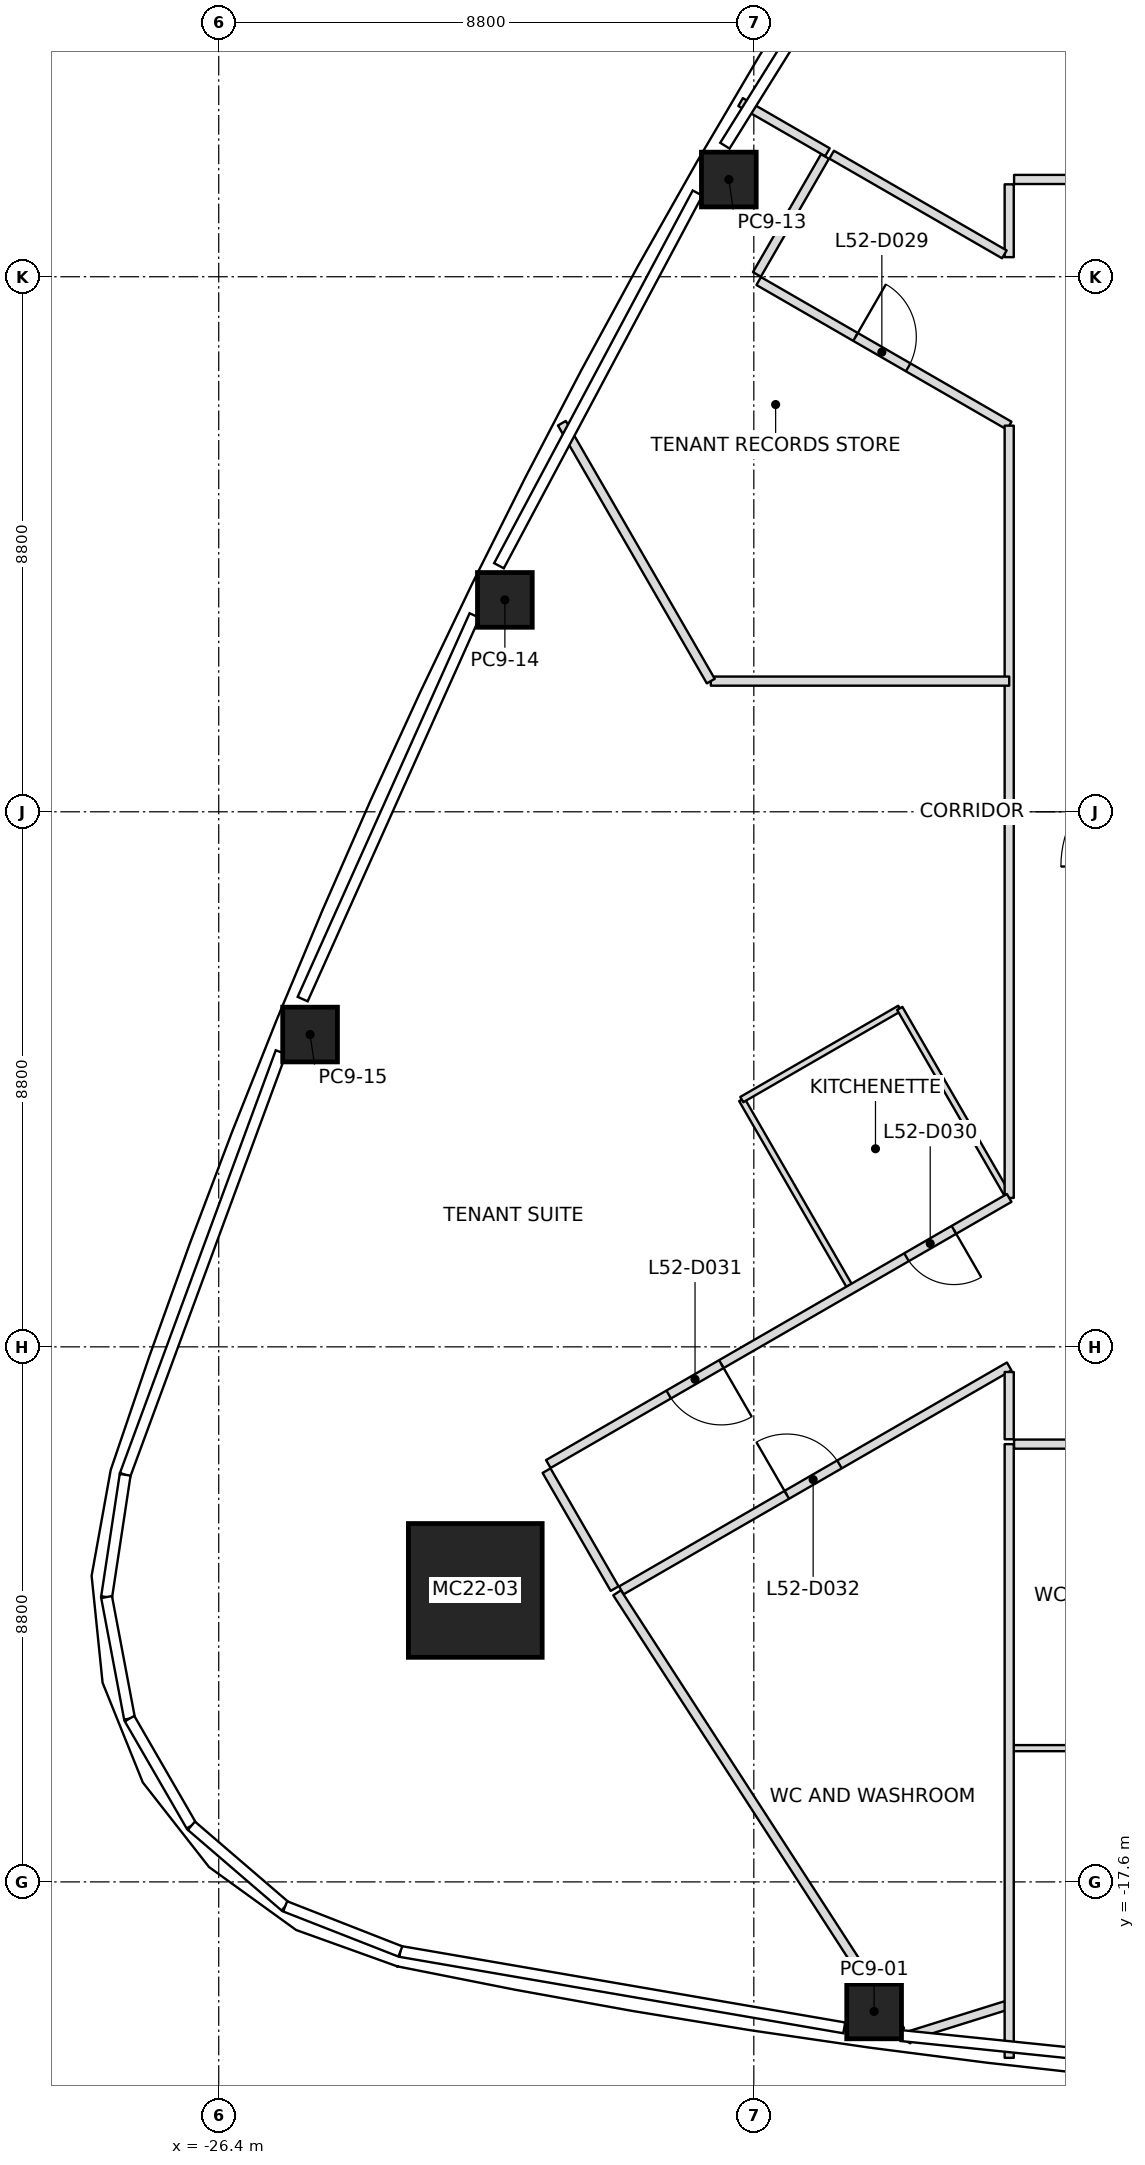
"""IFC4 building model, lengths in metres.
Left out: names, types, materials, properties, quantities, classifications, styles, units other than length and angle.
Written with IfcOpenShell. Run it as: python <this file> out.ifc"""

import sys

from ifc_helpers import new_model, si_unit, direction, frame, frame_2d, origin, origin_2d, place, context, subcontext, project, spatial, rectangle, extrude, element, fill, save


model = new_model("IFC4")
c1 = context("Model", 3, precision=1e-05, world=origin(), true_north=direction((0.0, 1.0)))
c2 = subcontext(c1, "Body", "Model", "MODEL_VIEW")
j1 = project(units=[si_unit("LENGTHUNIT", "METRE"), si_unit("PLANEANGLEUNIT", "RADIAN")], contexts=[c1])
p1 = place(None, origin())
s1 = spatial("IfcSite", under=j1, at=p1, CompositionType="ELEMENT")
p2 = place(p1, origin())
s2 = spatial("IfcBuilding", under=s1, at=p2, CompositionType="ELEMENT")
p3 = place(p2, frame((0.0, 0.0, 235.0)))
s3 = spatial("IfcBuildingStorey", under=s2, at=p3, CompositionType="ELEMENT", Elevation=235.0)
p4 = place(p3, frame((-22.181, -12.806, 0.0), z_axis=(0.027939561831, 0.016104900269, 0.999479871269), x_axis=(0.999609614242, -0.000450139585, -0.027935935454)))
e1 = element("IfcColumn", 1, at=p4, inside=s3, PredefinedType="COLUMN", context=c2, shape_type="SweptSolid", body=[
    extrude(rectangle(XDim=2.2, YDim=2.2, at=origin_2d()), origin(), (0.0, 0.0, 1.0), 4.002),
])
p5 = place(p3, frame((-15.622, -19.73, 0.0), z_axis=(0.017513460473, 0.010373826761, 0.999792809746), x_axis=(-0.990562226516, 0.136133815888, 0.015939246235)))
e2 = element("IfcColumn", 2, at=p5, inside=s3, PredefinedType="COLUMN", context=c2, shape_type="SweptSolid", body=[
    extrude(rectangle(XDim=0.9, YDim=0.9, at=origin_2d()), origin(), (0.0, 0.0, 1.0), 4.001),
])
p6 = place(p3, frame((-18.011, 10.399, 0.0), z_axis=(0.009948074445, -0.005736926367, 0.999934059571), x_axis=(0.499975258342, 0.8660396879, -5.385525e-06)))
e3 = element("IfcColumn", 3, at=p6, inside=s3, PredefinedType="COLUMN", context=c2, shape_type="SweptSolid", body=[
    extrude(rectangle(XDim=0.9, YDim=0.9, at=origin_2d()), origin(), (0.0, 0.0, 1.0), 4.0),
])
p7 = place(p3, frame((-21.694, 3.485, 0.0), z_axis=(0.014097691364, 0.002013955909, 0.999898594398), x_axis=(0.439784175412, 0.89806777484, -0.008009422674)))
e4 = element("IfcColumn", 4, at=p7, inside=s3, PredefinedType="COLUMN", context=c2, shape_type="SweptSolid", body=[
    extrude(rectangle(XDim=0.9, YDim=0.9, at=origin_2d()), origin(), (0.0, 0.0, 1.0), 4.0),
])
p8 = place(p3, frame((-24.898, -3.664, 0.0), z_axis=(0.017818554314, 0.009946658744, 0.999791759869), x_axis=(0.377551359736, 0.925851441323, -0.015939867064)))
e5 = element("IfcColumn", 5, at=p8, inside=s3, PredefinedType="COLUMN", context=c2, shape_type="SweptSolid", body=[
    extrude(rectangle(XDim=0.9, YDim=0.9, at=origin_2d()), origin(), (0.0, 0.0, 1.0), 4.001),
])
p9 = place(p3, frame((-13.4, 2.149, 0.0), z_axis=(0.0, 0.0, 1.0), x_axis=(-1.0, 0.0, 0.0)))
e6 = element("IfcWall", 6, at=p9, inside=s3, PredefinedType="PARTITIONING", context=c2, shape_type="SweptSolid", body=[
    extrude(rectangle(XDim=4.908, YDim=0.15, at=frame_2d((2.454, 0.0))), origin(), (0.0, 0.0, 1.0), 3.45),
])
p10 = place(p3, frame((-18.308, 2.149, 0.0), z_axis=(0.0, 0.0, 1.0), x_axis=(-0.499982769143, 0.866035351796, 0.0)))
e7 = element("IfcWall", 7, at=p10, inside=s3, PredefinedType="PARTITIONING", context=c2, shape_type="SweptSolid", body=[
    extrude(rectangle(XDim=4.898, YDim=0.15, at=frame_2d((2.449, 0.0))), origin(), (0.0, 0.0, 1.0), 3.234),
])
p11 = place(p3, frame((-19.849, -12.845, 0.0), z_axis=(0.0, 0.0, 1.0), x_axis=(0.543041092905, -0.839706122055, 0.0)))
e8 = element("IfcWall", 8, at=p11, inside=s3, PredefinedType="PARTITIONING", context=c2, shape_type="SweptSolid", body=[
    extrude(rectangle(XDim=8.573, YDim=0.15, at=frame_2d((4.287, 0.0))), origin(), (0.0, 0.0, 1.0), 3.45),
])
p12 = place(p3, frame((-16.389, 10.848, 0.0), z_axis=(0.0, 0.0, 1.0), x_axis=(-0.866067297121, 0.499927431592, 0.0)))
e9 = element("IfcWall", 9, at=p12, inside=s3, PredefinedType="PARTITIONING", context=c2, shape_type="SweptSolid", body=[
    extrude(rectangle(XDim=1.65, YDim=0.15, at=frame_2d((0.825, 0.0))), origin(), (0.0, 0.0, 1.0), 3.234),
])
p13 = place(p3, frame((-15.043, -20.131, 0.0), z_axis=(0.0, 0.0, 1.0), x_axis=(0.954404246186, 0.298517227076, 0.0)))
e10 = element("IfcWall", 10, at=p13, inside=s3, PredefinedType="PARTITIONING", context=c2, shape_type="SweptSolid", body=[
    extrude(rectangle(XDim=1.722, YDim=0.15, at=frame_2d((0.861, 0.0))), origin(), (0.0, 0.0, 1.0), 3.234),
])
p14 = place(p3, frame((-13.4, -20.494, 0.0), z_axis=(0.0, 0.0, 1.0), x_axis=(0.0, 1.0, 0.0)))
e11 = element("IfcWall", 11, at=p14, inside=s3, PredefinedType="PARTITIONING", context=c2, shape_type="SweptSolid", body=[
    extrude(rectangle(XDim=10.094, YDim=0.15, at=frame_2d((5.047, 0.0))), origin(), (0.0, 0.0, 1.0), 3.234),
])
p15 = place(p3, frame((-15.093, -20.218, 0.0), z_axis=(0.0, 0.0, 1.0), x_axis=(0.500074377092, 0.865982457891, 0.0)))
e12 = element("IfcWall", 12, at=p15, inside=s3, PredefinedType="PARTITIONING", context=c2, shape_type="SweptSolid", body=[
    extrude(rectangle(XDim=0.1, YDim=0.15, at=frame_2d((0.05, 0.0))), origin(), (0.0, 0.0, 1.0), 3.45),
])
p16 = place(p3, frame((-21.009, -10.836, 0.0), z_axis=(0.0, 0.0, 1.0), x_axis=(0.500077830873, -0.865980463445, 0.0)))
e13 = element("IfcWall", 13, at=p16, inside=s3, PredefinedType="PARTITIONING", context=c2, shape_type="SweptSolid", body=[
    extrude(rectangle(XDim=2.24, YDim=0.15, at=frame_2d((1.12, 0.0))), origin(), (0.0, 0.0, 1.0), 3.233),
])
p17 = place(p3, frame((-17.52, 8.729, 0.0), z_axis=(0.0, 0.0, 1.0), x_axis=(0.866042865666, -0.499969753915, 0.0)))
e14 = element("IfcWall", 14, at=p17, inside=s3, PredefinedType="PARTITIONING", context=c2, shape_type="SweptSolid", body=[
    extrude(rectangle(XDim=4.757, YDim=0.15, at=frame_2d((2.378, 0.0))), origin(), (0.0, 0.0, 1.0), 3.45),
])
p18 = place(p17, frame((1.838, 0.0, 0.0)))
e15 = element("IfcOpeningElement", 15, at=p18, cuts=e14, PredefinedType="OPENING", context=c2, shape_type="SweptSolid", body=[
    extrude(rectangle(XDim=1.0, YDim=2.1, at=frame_2d((0.5, 1.05))), frame((0.0, 0.075, 0.0), z_axis=(0.0, -1.0, 0.0), x_axis=(1.0, 0.0, 0.0)), (0.0, 0.0, 1.0), 0.15),
])
p19 = place(p3, frame((-13.4, 6.351, 0.0), z_axis=(0.0, 0.0, 1.0), x_axis=(0.0, -1.0, 0.0)))
e16 = element("IfcWall", 16, at=p19, inside=s3, PredefinedType="PARTITIONING", context=c2, shape_type="SweptSolid", body=[
    extrude(rectangle(XDim=12.702, YDim=0.15, at=frame_2d((6.351, 0.0))), origin(), (0.0, 0.0, 1.0), 3.317),
])
p20 = place(p3, frame((-13.4, -6.351, 0.0), z_axis=(0.0, 0.0, 1.0), x_axis=(-0.866030434095, -0.499991287145, 0.0)))
e17 = element("IfcWall", 17, at=p20, inside=s3, PredefinedType="PARTITIONING", context=c2, shape_type="SweptSolid", body=[
    extrude(rectangle(XDim=8.752, YDim=0.15, at=frame_2d((4.376, 0.0))), origin(), (0.0, 0.0, 1.0), 3.317),
])
p21 = place(p20, frame((1.05, 0.0, 0.0)))
e18 = element("IfcOpeningElement", 18, at=p21, cuts=e17, PredefinedType="OPENING", context=c2, shape_type="SweptSolid", body=[
    extrude(rectangle(XDim=0.9, YDim=2.1, at=frame_2d((0.45, 1.05))), frame((0.0, 0.075, 0.0), z_axis=(0.0, -1.0, 0.0), x_axis=(1.0, 0.0, 0.0)), (0.0, 0.0, 1.0), 0.15),
])
p22 = place(p20, frame((5.466, 0.0, 0.0)))
e19 = element("IfcOpeningElement", 19, at=p22, cuts=e17, PredefinedType="OPENING", context=c2, shape_type="SweptSolid", body=[
    extrude(rectangle(XDim=1.0, YDim=2.1, at=frame_2d((0.5, 1.05))), frame((0.0, 0.075, 0.0), z_axis=(0.0, -1.0, 0.0), x_axis=(1.0, 0.0, 0.0)), (0.0, 0.0, 1.0), 0.15),
])
p23 = place(p3, frame((-19.78, -12.805, 0.0), z_axis=(0.0, 0.0, 1.0), x_axis=(0.866021670914, 0.500006465466, 0.0)))
e20 = element("IfcWall", 20, at=p23, inside=s3, PredefinedType="PARTITIONING", context=c2, shape_type="SweptSolid", body=[
    extrude(rectangle(XDim=7.367, YDim=0.15, at=frame_2d((3.683, 0.0))), origin(), (0.0, 0.0, 1.0), 3.233),
])
p24 = place(p23, frame((3.143, 0.0, 0.0)))
e21 = element("IfcOpeningElement", 21, at=p24, cuts=e20, PredefinedType="OPENING", context=c2, shape_type="SweptSolid", body=[
    extrude(rectangle(XDim=1.0, YDim=2.1, at=frame_2d((0.5, 1.05))), frame((0.0, 0.075, 0.0), z_axis=(0.0, -1.0, 0.0), x_axis=(1.0, 0.0, 0.0)), (0.0, 0.0, 1.0), 0.15),
])
p25 = place(p3, frame((-13.4, -9.214, 0.0), z_axis=(0.0, 0.0, 1.0), x_axis=(0.0, -1.0, 0.0)))
e22 = element("IfcWall", 22, at=p25, inside=s3, PredefinedType="PARTITIONING", context=c2, shape_type="SweptSolid", body=[
    extrude(rectangle(XDim=1.106, YDim=0.15, at=frame_2d((0.553, 0.0))), origin(), (0.0, 0.0, 1.0), 3.233),
])
p26 = place(p3, frame((-16.429, 10.779, 0.0), z_axis=(0.0, 0.0, 1.0), x_axis=(-0.49994888933, -0.866054910533, 0.0)))
e23 = element("IfcWall", 23, at=p26, inside=s3, PredefinedType="PARTITIONING", context=c2, shape_type="SweptSolid", body=[
    extrude(rectangle(XDim=2.24, YDim=0.15, at=frame_2d((1.12, 0.0))), origin(), (0.0, 0.0, 1.0), 3.45),
])
p27 = place(p3, frame((-13.4, 10.32, 0.0), z_axis=(0.0, 0.0, 1.0), x_axis=(0.0, -1.0, 0.0)))
e24 = element("IfcWall", 24, at=p27, inside=s3, PredefinedType="PARTITIONING", context=c2, shape_type="SweptSolid", body=[
    extrude(rectangle(XDim=1.198, YDim=0.15, at=frame_2d((0.599, 0.0))), origin(), (0.0, 0.0, 1.0), 3.45),
])
p28 = place(p3, frame((-13.479, 9.168, 0.0), z_axis=(0.0, 0.0, 1.0), x_axis=(-0.866021955858, 0.500005971936, 0.0)))
e25 = element("IfcWall", 25, at=p28, inside=s3, PredefinedType="PARTITIONING", context=c2, shape_type="SweptSolid", body=[
    extrude(rectangle(XDim=3.28, YDim=0.15, at=frame_2d((1.64, 0.0))), origin(), (0.0, 0.0, 1.0), 3.45),
])
p29 = place(p3, frame((-13.32, -10.4, 0.0), z_axis=(0.0, 0.0, 1.0), x_axis=(1.0, 0.0, 0.0)))
e26 = element("IfcWall", 26, at=p29, inside=s3, PredefinedType="PARTITIONING", context=c2, shape_type="SweptSolid", body=[
    extrude(rectangle(XDim=12.12, YDim=0.15, at=frame_2d((6.06, 0.0))), origin(), (0.0, 0.0, 1.0), 3.317),
])
p30 = place(p29, frame((1.57, 0.0, 0.0)))
e27 = element("IfcOpeningElement", 27, at=p30, cuts=e26, PredefinedType="OPENING", context=c2, shape_type="SweptSolid", body=[
    extrude(rectangle(XDim=0.9, YDim=2.1, at=frame_2d((0.45, 1.05))), frame((0.0, 0.075, 0.0), z_axis=(0.0, -1.0, 0.0), x_axis=(1.0, 0.0, 0.0)), (0.0, 0.0, 1.0), 0.15),
])
p31 = place(p29, frame((7.67, 0.0, 0.0)))
e28 = element("IfcOpeningElement", 28, at=p31, cuts=e26, PredefinedType="OPENING", context=c2, shape_type="SweptSolid", body=[
    extrude(rectangle(XDim=1.0, YDim=2.1, at=frame_2d((0.5, 1.05))), frame((0.0, 0.075, 0.0), z_axis=(0.0, -1.0, 0.0), x_axis=(1.0, 0.0, 0.0)), (0.0, 0.0, 1.0), 0.15),
])
p32 = place(p3, frame((-4.98, 10.4, 0.0), z_axis=(0.0, 0.0, 1.0), x_axis=(-1.0, 0.0, 0.0)))
e29 = element("IfcWall", 29, at=p32, inside=s3, PredefinedType="PARTITIONING", context=c2, shape_type="SweptSolid", body=[
    extrude(rectangle(XDim=8.34, YDim=0.15, at=frame_2d((4.17, 0.0))), origin(), (0.0, 0.0, 1.0), 3.317),
])
p33 = place(p32, frame((3.97, 0.0, 0.0)))
e30 = element("IfcOpeningElement", 30, at=p33, cuts=e29, PredefinedType="OPENING", context=c2, shape_type="SweptSolid", body=[
    extrude(rectangle(XDim=1.0, YDim=2.1, at=frame_2d((0.5, 1.05))), frame((0.0, 0.075, 0.0), z_axis=(0.0, -1.0, 0.0), x_axis=(1.0, 0.0, 0.0)), (0.0, 0.0, 1.0), 0.15),
])
p34 = place(p3, frame((-16.013, -7.825, 0.0), z_axis=(0.0, 0.0, 1.0), x_axis=(-0.499971082179, 0.866042098853, 0.0)))
e31 = element("IfcWall", 31, at=p34, inside=s3, PredefinedType="PARTITIONING", context=c2, shape_type="SweptSolid", body=[
    extrude(rectangle(XDim=3.57, YDim=0.1, at=frame_2d((1.785, 0.0))), origin(), (0.0, 0.0, 1.0), 3.317),
])
p35 = place(p3, frame((-17.798, -4.733, 0.0), z_axis=(0.0, 0.0, 1.0), x_axis=(0.866031096941, 0.499990139034, 0.0)))
e32 = element("IfcWall", 32, at=p35, inside=s3, PredefinedType="PARTITIONING", context=c2, shape_type="SweptSolid", body=[
    extrude(rectangle(XDim=3.0, YDim=0.1, at=frame_2d((1.5, 0.0))), origin(), (0.0, 0.0, 1.0), 3.317),
])
p36 = place(p3, frame((-15.2, -3.233, 0.0), z_axis=(0.0, 0.0, 1.0), x_axis=(0.500011000363, -0.866019052629, 0.0)))
e33 = element("IfcWall", 33, at=p36, inside=s3, PredefinedType="PARTITIONING", context=c2, shape_type="SweptSolid", body=[
    extrude(rectangle(XDim=3.54, YDim=0.1, at=frame_2d((1.77, 0.0))), origin(), (0.0, 0.0, 1.0), 3.317),
])
p37 = place(p3, frame((-9.2, -15.4, 0.0), z_axis=(0.0, 0.0, 1.0), x_axis=(-1.0, 0.0, 0.0)))
e34 = element("IfcWall", 34, at=p37, inside=s3, PredefinedType="PARTITIONING", context=c2, shape_type="SweptSolid", body=[
    extrude(rectangle(XDim=4.17, YDim=0.1, at=frame_2d((2.085, 0.0))), origin(), (0.0, 0.0, 1.0), 3.393),
])
p38 = place(p18, origin())
e35 = element("IfcDoor", 35, at=p38, inside=s3, OperationType="SINGLE_SWING_RIGHT", PredefinedType="DOOR", context=c2, shape_type="SweptSolid", body=[
    extrude(rectangle(XDim=1.0, YDim=2.1, at=frame_2d((0.5, 1.05))), frame((0.0, 0.025, 0.0), z_axis=(0.0, -1.0, 0.0), x_axis=(1.0, 0.0, 0.0)), (0.0, 0.0, 1.0), 0.05),
])
fill(e15, e35)
p39 = place(p21, origin())
e36 = element("IfcDoor", 36, at=p39, inside=s3, OperationType="SINGLE_SWING_LEFT", PredefinedType="DOOR", context=c2, shape_type="SweptSolid", body=[
    extrude(rectangle(XDim=0.9, YDim=2.1, at=frame_2d((0.45, 1.05))), frame((0.0, 0.025, 0.0), z_axis=(0.0, -1.0, 0.0), x_axis=(1.0, 0.0, 0.0)), (0.0, 0.0, 1.0), 0.05),
])
fill(e18, e36)
p40 = place(p22, origin())
e37 = element("IfcDoor", 37, at=p40, inside=s3, OperationType="SINGLE_SWING_RIGHT", PredefinedType="DOOR", context=c2, shape_type="SweptSolid", body=[
    extrude(rectangle(XDim=1.0, YDim=2.1, at=frame_2d((0.5, 1.05))), frame((0.0, 0.025, 0.0), z_axis=(0.0, -1.0, 0.0), x_axis=(1.0, 0.0, 0.0)), (0.0, 0.0, 1.0), 0.05),
])
fill(e19, e37)
p41 = place(p24, origin())
e38 = element("IfcDoor", 38, at=p41, inside=s3, OperationType="SINGLE_SWING_LEFT", PredefinedType="DOOR", context=c2, shape_type="SweptSolid", body=[
    extrude(rectangle(XDim=1.0, YDim=2.1, at=frame_2d((0.5, 1.05))), frame((0.0, 0.025, 0.0), z_axis=(0.0, -1.0, 0.0), x_axis=(1.0, 0.0, 0.0)), (0.0, 0.0, 1.0), 0.05),
])
fill(e21, e38)
save(model, sys.argv[1])
